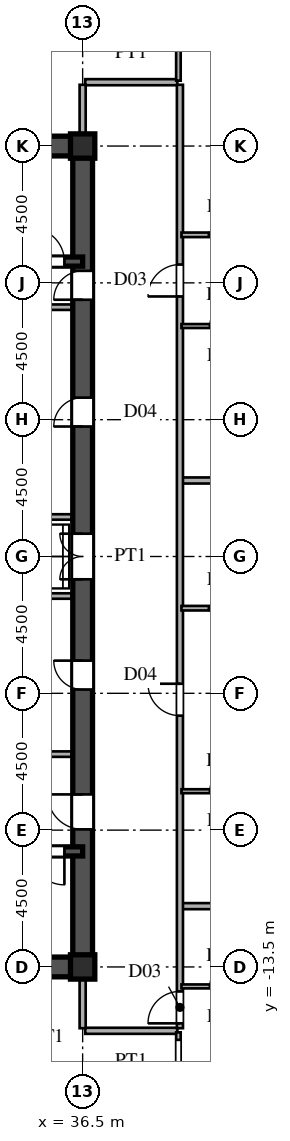
"""IFC4 building model, lengths in metres.
Left out: names, types, materials, properties, quantities, classifications, styles, units other than length and angle.
Written with IfcOpenShell. Run it as: python <this file> out.ifc"""

import sys

from ifc_helpers import new_model, si_unit, direction, frame, frame_2d, origin, origin_2d, place, context, subcontext, project, spatial, rectangle, i_section, extrude, source, transform, mapped, element, fill, save


model = new_model("IFC4")
c1 = context("Model", 3, precision=1e-05, world=origin(), true_north=direction((0.0, 1.0)))
c2 = subcontext(c1, "Body", "Model", "MODEL_VIEW")
j1 = project(units=[si_unit("LENGTHUNIT", "METRE"), si_unit("PLANEANGLEUNIT", "RADIAN")], contexts=[c1])
p1 = place(None, origin())
s1 = spatial("IfcSite", under=j1, at=p1, CompositionType="ELEMENT")
p2 = place(p1, origin())
s2 = spatial("IfcBuilding", under=s1, at=p2, CompositionType="ELEMENT")
p3 = place(p2, frame((0.0, 0.0, 62.1)))
s3 = spatial("IfcBuildingStorey", under=s2, at=p3, CompositionType="ELEMENT", Elevation=62.1)
m1 = source(origin(), c2, "Body", "SweptSolid", [
    extrude(i_section(OverallWidth=0.8, OverallDepth=0.8, WebThickness=0.032, FlangeThickness=0.05, at=origin_2d()), origin(), (0.0, 0.0, 1.0), 3.6),
])
for number, where, z_axis, x_axis in (
    (1, (36.5, -13.5, 0.0), (0.0, 0.0, 1.0), (1.0, 0.0, 0.0)),
    (2, (36.5, 13.5, 0.0), (0.0, 0.0, 1.0), (1.0, 0.0, 0.0)),
):
    element("IfcColumn", number, at=place(p3, frame(where, z_axis=z_axis, x_axis=x_axis)), inside=s3, PredefinedType="COLUMN", context=c2, shape_type="MappedRepresentation", body=[
        mapped(m1, transform((0.0, 0.0, 0.0), scale=1.0)),
    ])
for number, where, z_axis, x_axis in (
    (3, (27.5, -13.5, 0.0), (0.0, 0.0, 1.0), (1.0, 0.0, 0.0)),
    (4, (27.5, 13.5, 0.0), (0.0, 0.0, 1.0), (1.0, 0.0, 0.0)),
):
    element("IfcWall", number, at=place(p3, frame(where, z_axis=z_axis, x_axis=x_axis)), inside=s3, PredefinedType="SHEAR", context=c2, shape_type="SweptSolid", body=[
        extrude(rectangle(XDim=9.0, YDim=0.65, at=frame_2d((4.5, 0.0))), origin(), (0.0, 0.0, 1.0), 3.38),
    ])
p4 = place(p3, frame((36.5, -13.65, 0.0), z_axis=(0.0, 0.0, 1.0), x_axis=(0.0, 1.0, 0.0)))
e5 = element("IfcWall", 5, at=p4, inside=s3, PredefinedType="SHEAR", context=c2, shape_type="SweptSolid", body=[
    extrude(rectangle(XDim=7.15, YDim=0.65, at=frame_2d((3.575, 0.0))), origin(), (0.0, 0.0, 1.0), 3.38),
])
p5 = place(p4, frame((4.675, 0.0, 0.0)))
e6 = element("IfcOpeningElement", 6, at=p5, cuts=e5, PredefinedType="OPENING", context=c2, shape_type="SweptSolid", body=[
    extrude(rectangle(XDim=1.15, YDim=2.2, at=frame_2d((0.575, 1.1))), frame((0.0, 0.335, 0.0), z_axis=(0.0, -1.0, 0.0), x_axis=(1.0, 0.0, 0.0)), (0.0, 0.0, 1.0), 0.67),
])
p6 = place(p3, frame((36.5, -1.3, 0.0), z_axis=(0.0, 0.0, 1.0), x_axis=(0.0, 1.0, 0.0)))
e7 = element("IfcWall", 7, at=p6, inside=s3, PredefinedType="SHEAR", context=c2, shape_type="SweptSolid", body=[
    extrude(rectangle(XDim=2.6, YDim=0.65, at=frame_2d((1.3, 0.0))), origin(), (0.0, 0.0, 1.0), 3.38),
])
p7 = place(p6, frame((0.55, 0.0, 0.0)))
e8 = element("IfcOpeningElement", 8, at=p7, cuts=e7, PredefinedType="OPENING", context=c2, shape_type="SweptSolid", body=[
    extrude(rectangle(XDim=1.5, YDim=2.3, at=frame_2d((0.75, 1.15))), frame((0.0, 0.335, 0.0), z_axis=(0.0, -1.0, 0.0), x_axis=(1.0, 0.0, 0.0)), (0.0, 0.0, 1.0), 0.67),
])
p8 = place(p3, frame((36.5, 8.2, 0.0), z_axis=(0.0, 0.0, 1.0), x_axis=(0.0, 1.0, 0.0)))
e9 = element("IfcWall", 9, at=p8, inside=s3, PredefinedType="SHEAR", context=c2, shape_type="SweptSolid", body=[
    extrude(rectangle(XDim=5.45, YDim=0.65, at=frame_2d((2.725, 0.0))), origin(), (0.0, 0.0, 1.0), 3.38),
])
p9 = place(p8, frame((0.245, 0.0, 0.0)))
e10 = element("IfcOpeningElement", 10, at=p9, cuts=e9, PredefinedType="OPENING", context=c2, shape_type="SweptSolid", body=[
    extrude(rectangle(XDim=0.95, YDim=2.15, at=frame_2d((0.475, 1.075))), frame((0.0, 0.335, 0.0), z_axis=(0.0, -1.0, 0.0), x_axis=(1.0, 0.0, 0.0)), (0.0, 0.0, 1.0), 0.67),
])
p10 = place(p3, frame((36.5, -6.5, 0.0), z_axis=(0.0, 0.0, 1.0), x_axis=(0.0, 1.0, 0.0)))
e11 = element("IfcWall", 11, at=p10, inside=s3, PredefinedType="SHEAR", context=c2, shape_type="SweptSolid", body=[
    extrude(rectangle(XDim=5.2, YDim=0.65, at=frame_2d((2.6, 0.0))), origin(), (0.0, 0.0, 1.0), 3.38),
])
p11 = place(p10, frame((2.125, 0.0, 0.0)))
e12 = element("IfcOpeningElement", 12, at=p11, cuts=e11, PredefinedType="OPENING", context=c2, shape_type="SweptSolid", body=[
    extrude(rectangle(XDim=0.95, YDim=2.15, at=frame_2d((0.475, 1.075))), frame((0.0, 0.335, 0.0), z_axis=(0.0, -1.0, 0.0), x_axis=(1.0, 0.0, 0.0)), (0.0, 0.0, 1.0), 0.67),
])
p12 = place(p3, frame((36.5, 1.3, 0.0), z_axis=(0.0, 0.0, 1.0), x_axis=(0.0, 1.0, 0.0)))
e13 = element("IfcWall", 13, at=p12, inside=s3, PredefinedType="SHEAR", context=c2, shape_type="SweptSolid", body=[
    extrude(rectangle(XDim=6.9, YDim=0.65, at=frame_2d((3.45, 0.0))), origin(), (0.0, 0.0, 1.0), 3.38),
])
p13 = place(p12, frame((2.975, 0.0, 0.0)))
e14 = element("IfcOpeningElement", 14, at=p13, cuts=e13, PredefinedType="OPENING", context=c2, shape_type="SweptSolid", body=[
    extrude(rectangle(XDim=0.95, YDim=2.15, at=frame_2d((0.475, 1.075))), frame((0.0, 0.335, 0.0), z_axis=(0.0, -1.0, 0.0), x_axis=(1.0, 0.0, 0.0)), (0.0, 0.0, 1.0), 0.67),
])
p14 = place(p3, frame((27.5, -9.7, 0.0), z_axis=(0.0, 0.0, 1.0), x_axis=(1.0, 0.0, 0.0)))
e15 = element("IfcWall", 15, at=p14, inside=s3, PredefinedType="SHEAR", context=c2, shape_type="SweptSolid", body=[
    extrude(rectangle(XDim=9.0, YDim=0.3, at=frame_2d((4.5, 0.0))), origin(), (0.0, 0.0, 1.0), 3.38),
])
p15 = place(p14, frame((7.3, 0.0, 0.0)))
e16 = element("IfcOpeningElement", 16, at=p15, cuts=e15, PredefinedType="OPENING", context=c2, shape_type="SweptSolid", body=[
    extrude(rectangle(XDim=1.1, YDim=2.2, at=frame_2d((0.55, 1.1))), frame((0.0, 0.16, 0.0), z_axis=(0.0, -1.0, 0.0), x_axis=(1.0, 0.0, 0.0)), (0.0, 0.0, 1.0), 0.32),
])
p16 = place(p3, frame((27.5, 9.7, 0.0), z_axis=(0.0, 0.0, 1.0), x_axis=(1.0, 0.0, 0.0)))
e17 = element("IfcWall", 17, at=p16, inside=s3, PredefinedType="SHEAR", context=c2, shape_type="SweptSolid", body=[
    extrude(rectangle(XDim=9.0, YDim=0.3, at=frame_2d((4.5, 0.0))), origin(), (0.0, 0.0, 1.0), 3.38),
])
p17 = place(p16, frame((7.3, 0.0, 0.0)))
e18 = element("IfcOpeningElement", 18, at=p17, cuts=e17, PredefinedType="OPENING", context=c2, shape_type="SweptSolid", body=[
    extrude(rectangle(XDim=1.1, YDim=2.2, at=frame_2d((0.55, 1.1))), frame((0.0, 0.16, 0.0), z_axis=(0.0, -1.0, 0.0), x_axis=(1.0, 0.0, 0.0)), (0.0, 0.0, 1.0), 0.32),
])
for number, where, z_axis, x_axis in (
    (19, (30.45, -6.5, 0.0), (0.0, 0.0, 1.0), (1.0, 0.0, 0.0)),
    (20, (30.45, 8.2, 0.0), (0.0, 0.0, 1.0), (1.0, 0.0, 0.0)),
):
    element("IfcWall", number, at=place(p3, frame(where, z_axis=z_axis, x_axis=x_axis)), inside=s3, PredefinedType="PARTITIONING", context=c2, shape_type="SweptSolid", body=[
        extrude(rectangle(XDim=5.7, YDim=0.18, at=frame_2d((2.85, 0.0))), origin(), (0.0, 0.0, 1.0), 3.38),
    ])
for number, where, z_axis, x_axis in (
    (21, (33.2, -1.3, 0.0), (0.0, 0.0, 1.0), (1.0, 0.0, 0.0)),
    (22, (33.2, 1.3, 0.0), (0.0, 0.0, 1.0), (1.0, 0.0, 0.0)),
):
    element("IfcWall", number, at=place(p3, frame(where, z_axis=z_axis, x_axis=x_axis)), inside=s3, PredefinedType="PARTITIONING", context=c2, shape_type="SweptSolid", body=[
        extrude(rectangle(XDim=2.95, YDim=0.18, at=frame_2d((1.475, 0.0))), origin(), (0.0, 0.0, 1.0), 3.38),
    ])
p18 = place(p3, frame((36.585, -15.6, 0.0), z_axis=(0.0, 0.0, 1.0), x_axis=(1.0, 0.0, 0.0)))
e23 = element("IfcWall", 23, at=p18, inside=s3, PredefinedType="PARTITIONING", context=c2, shape_type="SweptSolid", body=[
    extrude(rectangle(XDim=3.03, YDim=0.2, at=frame_2d((1.515, 0.0))), origin(), (0.0, 0.0, 1.0), 3.38),
])
p19 = place(p3, frame((39.75, -14.14, 0.0), z_axis=(0.0, 0.0, 1.0), x_axis=(1.0, 0.0, 0.0)))
e24 = element("IfcWall", 24, at=p19, inside=s3, PredefinedType="PARTITIONING", context=c2, shape_type="SweptSolid", body=[
    extrude(rectangle(XDim=2.75, YDim=0.13, at=frame_2d((1.375, 0.0))), origin(), (0.0, 0.0, 1.0), 3.38),
])
p20 = place(p19, frame((0.935, 0.0, 0.0)))
e25 = element("IfcOpeningElement", 25, at=p20, cuts=e24, PredefinedType="OPENING", context=c2, shape_type="SweptSolid", body=[
    extrude(rectangle(XDim=0.88, YDim=2.1, at=frame_2d((0.44, 1.05))), frame((0.0, 0.075, 0.0), z_axis=(0.0, -1.0, 0.0), x_axis=(1.0, 0.0, 0.0)), (0.0, 0.0, 1.0), 0.15),
])
p21 = place(p3, frame((39.78, -11.5, 0.0), z_axis=(0.0, 0.0, 1.0), x_axis=(1.0, 0.0, 0.0)))
e26 = element("IfcWall", 26, at=p21, inside=s3, PredefinedType="PARTITIONING", context=c2, shape_type="SweptSolid", body=[
    extrude(rectangle(XDim=22.343, YDim=0.2, at=frame_2d((11.171, 0.0))), origin(), (0.0, 0.0, 1.0), 3.38),
])
p22 = place(p3, frame((39.75, -7.72, 0.0), z_axis=(0.0, 0.0, 1.0), x_axis=(1.0, 0.0, 0.0)))
e27 = element("IfcWall", 27, at=p22, inside=s3, PredefinedType="PARTITIONING", context=c2, shape_type="SweptSolid", body=[
    extrude(rectangle(XDim=2.75, YDim=0.13, at=frame_2d((1.375, 0.0))), origin(), (0.0, 0.0, 1.0), 3.38),
])
p23 = place(p22, frame((0.935, 0.0, 0.0)))
e28 = element("IfcOpeningElement", 28, at=p23, cuts=e27, PredefinedType="OPENING", context=c2, shape_type="SweptSolid", body=[
    extrude(rectangle(XDim=0.88, YDim=2.1, at=frame_2d((0.44, 1.05))), frame((0.0, 0.075, 0.0), z_axis=(0.0, -1.0, 0.0), x_axis=(1.0, 0.0, 0.0)), (0.0, 0.0, 1.0), 0.15),
])
p24 = place(p3, frame((39.75, -1.7, 0.0), z_axis=(0.0, 0.0, 1.0), x_axis=(1.0, 0.0, 0.0)))
e29 = element("IfcWall", 29, at=p24, inside=s3, PredefinedType="PARTITIONING", context=c2, shape_type="SweptSolid", body=[
    extrude(rectangle(XDim=2.75, YDim=0.15, at=frame_2d((1.375, 0.0))), origin(), (0.0, 0.0, 1.0), 3.38),
])
p25 = place(p24, frame((0.9, 0.0, 0.0)))
e30 = element("IfcOpeningElement", 30, at=p25, cuts=e29, PredefinedType="OPENING", context=c2, shape_type="SweptSolid", body=[
    extrude(rectangle(XDim=0.95, YDim=2.15, at=frame_2d((0.475, 1.075))), frame((0.0, 0.085, 0.0), z_axis=(0.0, -1.0, 0.0), x_axis=(1.0, 0.0, 0.0)), (0.0, 0.0, 1.0), 0.17),
])
p26 = place(p3, frame((39.78, 2.5, 0.0), z_axis=(0.0, 0.0, 1.0), x_axis=(1.0, 0.0, 0.0)))
e31 = element("IfcWall", 31, at=p26, inside=s3, PredefinedType="PARTITIONING", context=c2, shape_type="SweptSolid", body=[
    extrude(rectangle(XDim=31.225, YDim=0.2, at=frame_2d((15.612, 0.0))), origin(), (0.0, 0.0, 1.0), 3.38),
])
p27 = place(p3, frame((39.75, 7.58, 0.0), z_axis=(0.0, 0.0, 1.0), x_axis=(1.0, 0.0, 0.0)))
e32 = element("IfcWall", 32, at=p27, inside=s3, PredefinedType="PARTITIONING", context=c2, shape_type="SweptSolid", body=[
    extrude(rectangle(XDim=2.75, YDim=0.13, at=frame_2d((1.375, 0.0))), origin(), (0.0, 0.0, 1.0), 3.38),
])
p28 = place(p27, frame((0.935, 0.0, 0.0)))
e33 = element("IfcOpeningElement", 33, at=p28, cuts=e32, PredefinedType="OPENING", context=c2, shape_type="SweptSolid", body=[
    extrude(rectangle(XDim=0.88, YDim=2.1, at=frame_2d((0.44, 1.05))), frame((0.0, 0.075, 0.0), z_axis=(0.0, -1.0, 0.0), x_axis=(1.0, 0.0, 0.0)), (0.0, 0.0, 1.0), 0.15),
])
p29 = place(p3, frame((39.75, 10.58, 0.0), z_axis=(0.0, 0.0, 1.0), x_axis=(1.0, 0.0, 0.0)))
e34 = element("IfcWall", 34, at=p29, inside=s3, PredefinedType="PARTITIONING", context=c2, shape_type="SweptSolid", body=[
    extrude(rectangle(XDim=2.75, YDim=0.15, at=frame_2d((1.375, 0.0))), origin(), (0.0, 0.0, 1.0), 3.38),
])
p30 = place(p29, frame((0.9, 0.0, 0.0)))
e35 = element("IfcOpeningElement", 35, at=p30, cuts=e34, PredefinedType="OPENING", context=c2, shape_type="SweptSolid", body=[
    extrude(rectangle(XDim=0.95, YDim=2.15, at=frame_2d((0.475, 1.075))), frame((0.0, 0.085, 0.0), z_axis=(0.0, -1.0, 0.0), x_axis=(1.0, 0.0, 0.0)), (0.0, 0.0, 1.0), 0.17),
])
p31 = place(p3, frame((36.585, 15.6, 0.0), z_axis=(0.0, 0.0, 1.0), x_axis=(1.0, 0.0, 0.0)))
e36 = element("IfcWall", 36, at=p31, inside=s3, PredefinedType="PARTITIONING", context=c2, shape_type="SweptSolid", body=[
    extrude(rectangle(XDim=3.03, YDim=0.2, at=frame_2d((1.515, 0.0))), origin(), (0.0, 0.0, 1.0), 3.38),
])
for number, where, z_axis, x_axis in (
    (37, (36.5, -15.515, 0.0), (0.0, 0.0, 1.0), (0.0, 1.0, 0.0)),
    (38, (36.5, 13.83, 0.0), (0.0, 0.0, 1.0), (0.0, 1.0, 0.0)),
):
    element("IfcWall", number, at=place(p3, frame(where, z_axis=z_axis, x_axis=x_axis)), inside=s3, PredefinedType="PARTITIONING", context=c2, shape_type="SweptSolid", body=[
        extrude(rectangle(XDim=1.685, YDim=0.2, at=frame_2d((0.842, 0.0))), origin(), (0.0, 0.0, 1.0), 2.68),
    ])
p32 = place(p3, frame((39.65, -21.642, 0.0), z_axis=(0.0, 0.0, 1.0), x_axis=(0.0, 1.0, 0.0)))
e39 = element("IfcWall", 39, at=p32, inside=s3, PredefinedType="PARTITIONING", context=c2, shape_type="SweptSolid", body=[
    extrude(rectangle(XDim=5.992, YDim=0.15, at=frame_2d((2.996, 0.0))), origin(), (0.0, 0.0, 1.0), 3.38),
])
p33 = place(p32, frame((4.794, 0.0, 0.0)))
e40 = element("IfcOpeningElement", 40, at=p33, cuts=e39, PredefinedType="OPENING", context=c2, shape_type="SweptSolid", body=[
    extrude(rectangle(XDim=0.95, YDim=2.15, at=frame_2d((0.475, 1.075))), frame((0.0, 0.085, 0.0), z_axis=(0.0, -1.0, 0.0), x_axis=(1.0, 0.0, 0.0)), (0.0, 0.0, 1.0), 0.17),
])
p34 = place(p3, frame((39.65, 15.65, 0.0), z_axis=(0.0, 0.0, 1.0), x_axis=(0.0, 1.0, 0.0)))
e41 = element("IfcWall", 41, at=p34, inside=s3, PredefinedType="PARTITIONING", context=c2, shape_type="SweptSolid", body=[
    extrude(rectangle(XDim=5.992, YDim=0.15, at=frame_2d((2.996, 0.0))), origin(), (0.0, 0.0, 1.0), 3.38),
])
p35 = place(p34, frame((1.425, 0.0, 0.0)))
e42 = element("IfcOpeningElement", 42, at=p35, cuts=e41, PredefinedType="OPENING", context=c2, shape_type="SweptSolid", body=[
    extrude(rectangle(XDim=0.95, YDim=2.15, at=frame_2d((0.475, 1.075))), frame((0.0, 0.085, 0.0), z_axis=(0.0, -1.0, 0.0), x_axis=(1.0, 0.0, 0.0)), (0.0, 0.0, 1.0), 0.17),
])
p36 = place(p3, frame((39.7, -15.515, 0.0), z_axis=(0.0, 0.0, 1.0), x_axis=(0.0, 1.0, 0.0)))
e43 = element("IfcWall", 43, at=p36, inside=s3, PredefinedType="PARTITIONING", context=c2, shape_type="SweptSolid", body=[
    extrude(rectangle(XDim=31.03, YDim=0.2, at=frame_2d((15.515, 0.0))), origin(), (0.0, 0.0, 1.0), 3.38),
])
p37 = place(p36, frame((0.16, 0.0, 0.0)))
e44 = element("IfcOpeningElement", 44, at=p37, cuts=e43, PredefinedType="OPENING", context=c2, shape_type="SweptSolid", body=[
    extrude(rectangle(XDim=1.05, YDim=2.25, at=frame_2d((0.525, 1.125))), frame((0.0, 0.11, 0.0), z_axis=(0.0, -1.0, 0.0), x_axis=(1.0, 0.0, 0.0)), (0.0, 0.0, 1.0), 0.22),
])
p38 = place(p36, frame((10.28, 0.0, 0.0)))
e45 = element("IfcOpeningElement", 45, at=p38, cuts=e43, PredefinedType="OPENING", context=c2, shape_type="SweptSolid", body=[
    extrude(rectangle(XDim=1.05, YDim=2.25, at=frame_2d((0.525, 1.125))), frame((0.0, 0.11, 0.0), z_axis=(0.0, -1.0, 0.0), x_axis=(1.0, 0.0, 0.0)), (0.0, 0.0, 1.0), 0.22),
])
p39 = place(p36, frame((24.067, 0.0, 0.0)))
e46 = element("IfcOpeningElement", 46, at=p39, cuts=e43, PredefinedType="OPENING", context=c2, shape_type="SweptSolid", body=[
    extrude(rectangle(XDim=1.05, YDim=2.25, at=frame_2d((0.525, 1.125))), frame((0.0, 0.11, 0.0), z_axis=(0.0, -1.0, 0.0), x_axis=(1.0, 0.0, 0.0)), (0.0, 0.0, 1.0), 0.22),
])
m2 = source(origin(), c2, "Body", "SweptSolid", [
    extrude(rectangle(XDim=1.15, YDim=2.2, at=frame_2d((0.575, 1.1))), frame((0.0, 0.025, 0.0), z_axis=(0.0, -1.0, 0.0), x_axis=(1.0, 0.0, 0.0)), (0.0, 0.0, 1.0), 0.05),
])
p40 = place(p5, origin())
e47 = element("IfcDoor", 47, at=p40, inside=s3, OperationType="SINGLE_SWING_RIGHT", PredefinedType="DOOR", context=c2, shape_type="MappedRepresentation", body=[
    mapped(m2, transform((0.0, 0.0, 0.0), scale=1.0)),
])
fill(e6, e47)
m3 = source(origin(), c2, "Body", "SweptSolid", [
    extrude(rectangle(XDim=1.5, YDim=2.3, at=frame_2d((0.75, 1.15))), frame((0.0, 0.025, 0.0), z_axis=(0.0, -1.0, 0.0), x_axis=(1.0, 0.0, 0.0)), (0.0, 0.0, 1.0), 0.05),
])
p41 = place(p7, origin())
e48 = element("IfcDoor", 48, at=p41, inside=s3, OperationType="DOUBLE_SWING_LEFT", PredefinedType="DOOR", context=c2, shape_type="MappedRepresentation", body=[
    mapped(m3, transform((0.0, 0.0, 0.0), scale=1.0)),
])
fill(e8, e48)
m4 = source(origin(), c2, "Body", "SweptSolid", [
    extrude(rectangle(XDim=0.95, YDim=2.15, at=frame_2d((0.475, 1.075))), frame((0.0, 0.025, 0.0), z_axis=(0.0, -1.0, 0.0), x_axis=(1.0, 0.0, 0.0)), (0.0, 0.0, 1.0), 0.05),
])
p42 = place(p9, origin())
e49 = element("IfcDoor", 49, at=p42, inside=s3, OperationType="SINGLE_SWING_LEFT", PredefinedType="DOOR", context=c2, shape_type="MappedRepresentation", body=[
    mapped(m4, transform((0.0, 0.0, 0.0), scale=1.0)),
])
fill(e10, e49)
p43 = place(p11, origin())
e50 = element("IfcDoor", 50, at=p43, inside=s3, OperationType="SINGLE_SWING_RIGHT", PredefinedType="DOOR", context=c2, shape_type="MappedRepresentation", body=[
    mapped(m4, transform((0.0, 0.0, 0.0), scale=1.0)),
])
fill(e12, e50)
p44 = place(p13, origin())
e51 = element("IfcDoor", 51, at=p44, inside=s3, OperationType="SINGLE_SWING_LEFT", PredefinedType="DOOR", context=c2, shape_type="MappedRepresentation", body=[
    mapped(m4, transform((0.0, 0.0, 0.0), scale=1.0)),
])
fill(e14, e51)
m5 = source(origin(), c2, "Body", "SweptSolid", [
    extrude(rectangle(XDim=1.1, YDim=2.2, at=frame_2d((0.55, 1.1))), frame((0.0, 0.025, 0.0), z_axis=(0.0, -1.0, 0.0), x_axis=(1.0, 0.0, 0.0)), (0.0, 0.0, 1.0), 0.05),
])
p45 = place(p15, frame((1.1, 0.0, 0.0), z_axis=(0.0, 0.0, 1.0), x_axis=(-1.0, 0.0, 0.0)))
e52 = element("IfcDoor", 52, at=p45, inside=s3, OperationType="SINGLE_SWING_RIGHT", PredefinedType="DOOR", context=c2, shape_type="MappedRepresentation", body=[
    mapped(m5, transform((0.0, 0.0, 0.0), scale=1.0)),
])
fill(e16, e52)
p46 = place(p17, origin())
e53 = element("IfcDoor", 53, at=p46, inside=s3, OperationType="SINGLE_SWING_LEFT", PredefinedType="DOOR", context=c2, shape_type="MappedRepresentation", body=[
    mapped(m5, transform((0.0, 0.0, 0.0), scale=1.0)),
])
fill(e18, e53)
m6 = source(origin(), c2, "Body", "SweptSolid", [
    extrude(rectangle(XDim=0.88, YDim=2.1, at=frame_2d((0.44, 1.05))), frame((0.0, 0.025, 0.0), z_axis=(0.0, -1.0, 0.0), x_axis=(1.0, 0.0, 0.0)), (0.0, 0.0, 1.0), 0.05),
])
p47 = place(p20, origin())
e54 = element("IfcDoor", 54, at=p47, inside=s3, OperationType="SINGLE_SWING_RIGHT", PredefinedType="DOOR", context=c2, shape_type="MappedRepresentation", body=[
    mapped(m6, transform((0.0, 0.0, 0.0), scale=1.0)),
])
fill(e25, e54)
p48 = place(p23, origin())
e55 = element("IfcDoor", 55, at=p48, inside=s3, OperationType="SINGLE_SWING_RIGHT", PredefinedType="DOOR", context=c2, shape_type="MappedRepresentation", body=[
    mapped(m6, transform((0.0, 0.0, 0.0), scale=1.0)),
])
fill(e28, e55)
p49 = place(p28, origin())
e56 = element("IfcDoor", 56, at=p49, inside=s3, OperationType="SINGLE_SWING_RIGHT", PredefinedType="DOOR", context=c2, shape_type="MappedRepresentation", body=[
    mapped(m6, transform((0.0, 0.0, 0.0), scale=1.0)),
])
fill(e33, e56)
m7 = source(origin(), c2, "Body", "SweptSolid", [
    extrude(rectangle(XDim=1.05, YDim=2.25, at=frame_2d((0.525, 1.125))), frame((0.0, 0.025, 0.0), z_axis=(0.0, -1.0, 0.0), x_axis=(1.0, 0.0, 0.0)), (0.0, 0.0, 1.0), 0.05),
])
p50 = place(p37, origin())
e57 = element("IfcDoor", 57, at=p50, inside=s3, OperationType="SINGLE_SWING_LEFT", PredefinedType="DOOR", context=c2, shape_type="MappedRepresentation", body=[
    mapped(m7, transform((0.0, 0.0, 0.0), scale=1.0)),
])
fill(e44, e57)
p51 = place(p38, origin())
e58 = element("IfcDoor", 58, at=p51, inside=s3, OperationType="SINGLE_SWING_RIGHT", PredefinedType="DOOR", context=c2, shape_type="MappedRepresentation", body=[
    mapped(m7, transform((0.0, 0.0, 0.0), scale=1.0)),
])
fill(e45, e58)
p52 = place(p39, origin())
e59 = element("IfcDoor", 59, at=p52, inside=s3, OperationType="SINGLE_SWING_LEFT", PredefinedType="DOOR", context=c2, shape_type="MappedRepresentation", body=[
    mapped(m7, transform((0.0, 0.0, 0.0), scale=1.0)),
])
fill(e46, e59)
save(model, sys.argv[1])
